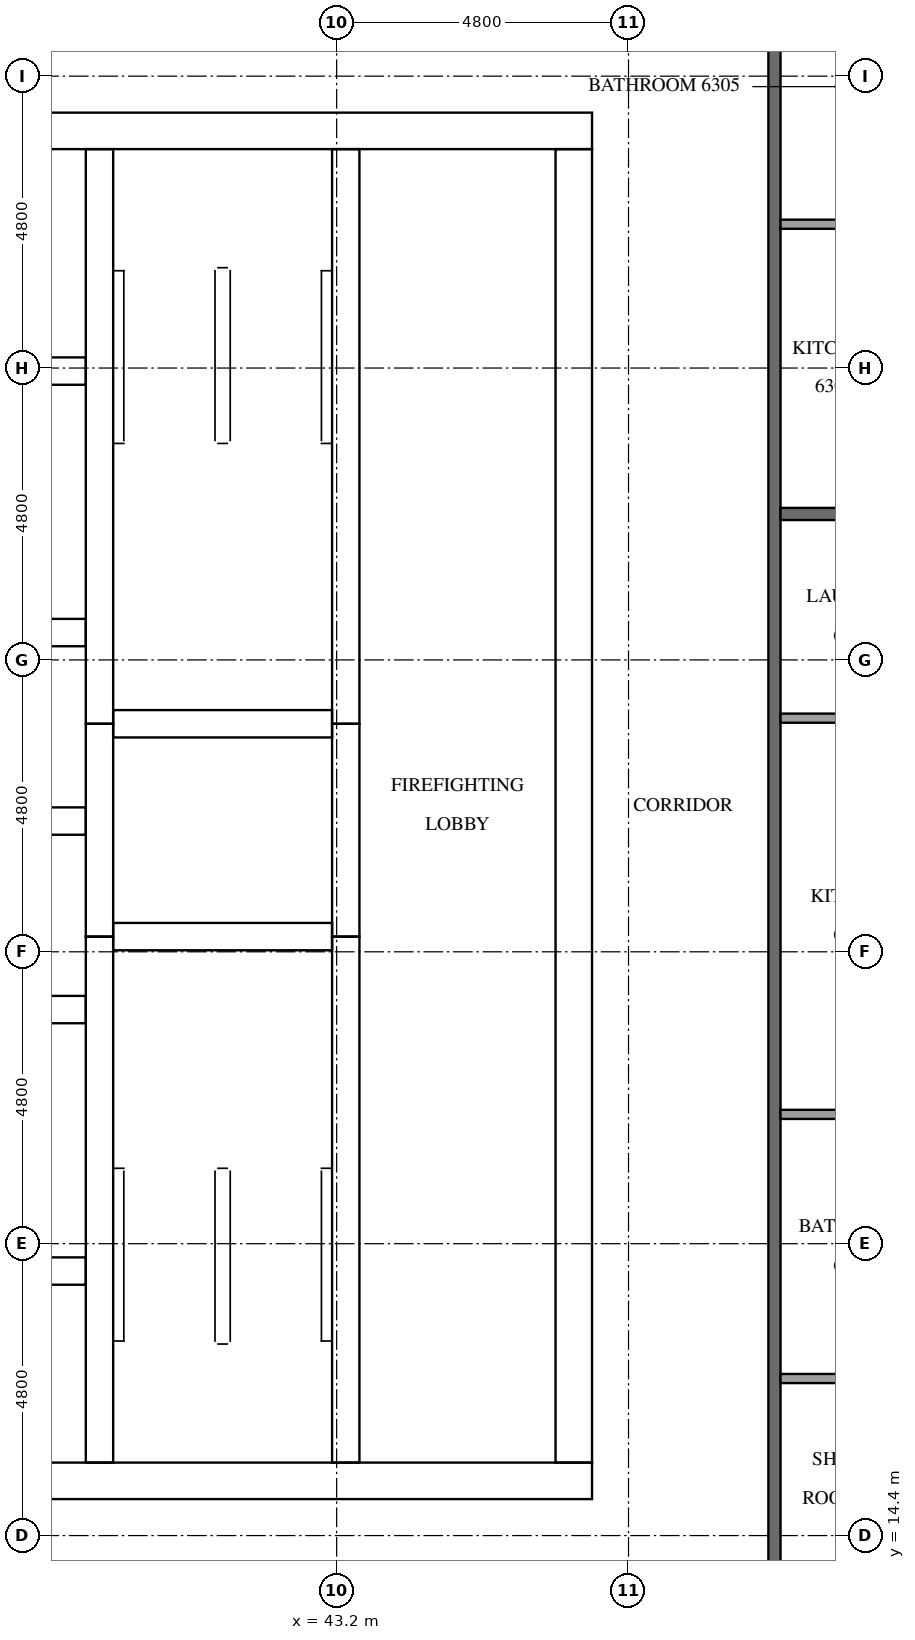
"""IFC4 building model, lengths in metres.
Left out: names, types, materials, properties, quantities, classifications, styles, units other than length and angle.
Written with IfcOpenShell. Run it as: python <this file> out.ifc"""

import sys

from ifc_helpers import new_model, si_unit, direction, frame, frame_2d, origin, place, context, subcontext, project, spatial, rectangle, extrude, element, fill, save


model = new_model("IFC4")
c1 = context("Model", 3, precision=1e-05, world=origin(), true_north=direction((0.0, 1.0)))
c2 = subcontext(c1, "Body", "Model", "MODEL_VIEW")
j1 = project(units=[si_unit("LENGTHUNIT", "METRE"), si_unit("PLANEANGLEUNIT", "RADIAN")], contexts=[c1])
p1 = place(None, origin())
s1 = spatial("IfcSite", under=j1, at=p1, CompositionType="ELEMENT")
p2 = place(p1, origin())
s2 = spatial("IfcBuilding", under=s1, at=p2, CompositionType="ELEMENT")
p3 = place(p2, frame((0.0, 0.0, 242.2)))
s3 = spatial("IfcBuildingStorey", under=s2, at=p3, CompositionType="ELEMENT", Elevation=242.2)
p4 = place(p3, frame((15.0, 15.3, 0.0), z_axis=(0.0, 0.0, 1.0), x_axis=(1.0, 0.0, 0.0)))
e1 = element("IfcWall", 1, at=p4, inside=s3, PredefinedType="SHEAR", context=c2, shape_type="SweptSolid", body=[
    extrude(rectangle(XDim=32.4, YDim=0.6, at=frame_2d((16.2, 0.0))), origin(), (0.0, 0.0, 1.0), 3.2),
])
p5 = place(p4, frame((15.3, 0.0, 0.0)))
e2 = element("IfcOpeningElement", 2, at=p5, cuts=e1, PredefinedType="OPENING", context=c2, shape_type="SweptSolid", body=[
    extrude(rectangle(XDim=1.8, YDim=2.1, at=frame_2d((0.9, 1.05))), frame((0.0, 0.31, 0.0), z_axis=(0.0, -1.0, 0.0), x_axis=(1.0, 0.0, 0.0)), (0.0, 0.0, 1.0), 0.62),
])
p6 = place(p3, frame((15.0, 37.5, 0.0), z_axis=(0.0, 0.0, 1.0), x_axis=(1.0, 0.0, 0.0)))
e3 = element("IfcWall", 3, at=p6, inside=s3, PredefinedType="SHEAR", context=c2, shape_type="SweptSolid", body=[
    extrude(rectangle(XDim=32.4, YDim=0.6, at=frame_2d((16.2, 0.0))), origin(), (0.0, 0.0, 1.0), 3.2),
])
p7 = place(p6, frame((15.3, 0.0, 0.0)))
e4 = element("IfcOpeningElement", 4, at=p7, cuts=e3, PredefinedType="OPENING", context=c2, shape_type="SweptSolid", body=[
    extrude(rectangle(XDim=1.8, YDim=2.1, at=frame_2d((0.9, 1.05))), frame((0.0, 0.31, 0.0), z_axis=(0.0, -1.0, 0.0), x_axis=(1.0, 0.0, 0.0)), (0.0, 0.0, 1.0), 0.62),
])
p8 = place(p6, frame((1.25, 0.0, 0.0)))
e5 = element("IfcOpeningElement", 5, at=p8, cuts=e3, PredefinedType="OPENING", context=c2, shape_type="SweptSolid", body=[
    extrude(rectangle(XDim=1.0, YDim=2.1, at=frame_2d((0.5, 1.05))), frame((0.0, 0.31, 0.0), z_axis=(0.0, -1.0, 0.0), x_axis=(1.0, 0.0, 0.0)), (0.0, 0.0, 1.0), 0.62),
])
p9 = place(p6, frame((4.988, 0.0, 0.0)))
e6 = element("IfcOpeningElement", 6, at=p9, cuts=e3, PredefinedType="OPENING", context=c2, shape_type="SweptSolid", body=[
    extrude(rectangle(XDim=1.0, YDim=2.1, at=frame_2d((0.5, 1.05))), frame((0.0, 0.31, 0.0), z_axis=(0.0, -1.0, 0.0), x_axis=(1.0, 0.0, 0.0)), (0.0, 0.0, 1.0), 0.62),
])
p10 = place(p3, frame((47.1, 15.6, 0.0), z_axis=(0.0, 0.0, 1.0), x_axis=(0.0, 1.0, 0.0)))
e7 = element("IfcWall", 7, at=p10, inside=s3, PredefinedType="SHEAR", context=c2, shape_type="SweptSolid", body=[
    extrude(rectangle(XDim=21.6, YDim=0.6, at=frame_2d((10.8, 0.0))), origin(), (0.0, 0.0, 1.0), 3.2),
])
p11 = place(p10, frame((10.5, 0.0, 0.0)))
e8 = element("IfcOpeningElement", 8, at=p11, cuts=e7, PredefinedType="OPENING", context=c2, shape_type="SweptSolid", body=[
    extrude(rectangle(XDim=1.2, YDim=2.1, at=frame_2d((0.6, 1.05))), frame((0.0, 0.31, 0.0), z_axis=(0.0, -1.0, 0.0), x_axis=(1.0, 0.0, 0.0)), (0.0, 0.0, 1.0), 0.62),
])
p12 = place(p3, frame((39.3, 15.6, 0.0), z_axis=(0.0, 0.0, 1.0), x_axis=(0.0, 1.0, 0.0)))
e9 = element("IfcWall", 9, at=p12, inside=s3, PredefinedType="SHEAR", context=c2, shape_type="SweptSolid", body=[
    extrude(rectangle(XDim=8.65, YDim=0.45, at=frame_2d((4.325, 0.0))), origin(), (0.0, 0.0, 1.0), 3.2),
])
p13 = place(p3, frame((39.3, 24.25, 0.0), z_axis=(0.0, 0.0, 1.0), x_axis=(0.0, 1.0, 0.0)))
e10 = element("IfcWall", 10, at=p13, inside=s3, PredefinedType="SHEAR", context=c2, shape_type="SweptSolid", body=[
    extrude(rectangle(XDim=3.5, YDim=0.45, at=frame_2d((1.75, 0.0))), origin(), (0.0, 0.0, 1.0), 3.2),
])
p14 = place(p3, frame((39.3, 27.75, 0.0), z_axis=(0.0, 0.0, 1.0), x_axis=(0.0, 1.0, 0.0)))
e11 = element("IfcWall", 11, at=p14, inside=s3, PredefinedType="SHEAR", context=c2, shape_type="SweptSolid", body=[
    extrude(rectangle(XDim=9.45, YDim=0.45, at=frame_2d((4.725, 0.0))), origin(), (0.0, 0.0, 1.0), 3.2),
])
p15 = place(p3, frame((43.35, 15.6, 0.0), z_axis=(0.0, 0.0, 1.0), x_axis=(0.0, 1.0, 0.0)))
e12 = element("IfcWall", 12, at=p15, inside=s3, PredefinedType="SHEAR", context=c2, shape_type="SweptSolid", body=[
    extrude(rectangle(XDim=8.65, YDim=0.45, at=frame_2d((4.325, 0.0))), origin(), (0.0, 0.0, 1.0), 3.2),
])
p16 = place(p15, frame((0.6, 0.0, 0.0)))
e13 = element("IfcOpeningElement", 13, at=p16, cuts=e12, PredefinedType="OPENING", context=c2, shape_type="SweptSolid", body=[
    extrude(rectangle(XDim=1.2, YDim=2.1, at=frame_2d((0.6, 1.05))), frame((0.0, 0.235, 0.0), z_axis=(0.0, -1.0, 0.0), x_axis=(1.0, 0.0, 0.0)), (0.0, 0.0, 1.0), 0.47),
])
p17 = place(p3, frame((43.35, 24.25, 0.0), z_axis=(0.0, 0.0, 1.0), x_axis=(0.0, 1.0, 0.0)))
e14 = element("IfcWall", 14, at=p17, inside=s3, PredefinedType="SHEAR", context=c2, shape_type="SweptSolid", body=[
    extrude(rectangle(XDim=3.5, YDim=0.45, at=frame_2d((1.75, 0.0))), origin(), (0.0, 0.0, 1.0), 3.2),
])
p18 = place(p17, frame((1.2, 0.0, 0.0)))
e15 = element("IfcOpeningElement", 15, at=p18, cuts=e14, PredefinedType="OPENING", context=c2, shape_type="SweptSolid", body=[
    extrude(rectangle(XDim=1.1, YDim=2.1, at=frame_2d((0.55, 1.05))), frame((0.0, 0.235, 0.0), z_axis=(0.0, -1.0, 0.0), x_axis=(1.0, 0.0, 0.0)), (0.0, 0.0, 1.0), 0.47),
])
p19 = place(p3, frame((43.35, 27.75, 0.0), z_axis=(0.0, 0.0, 1.0), x_axis=(0.0, 1.0, 0.0)))
e16 = element("IfcWall", 16, at=p19, inside=s3, PredefinedType="SHEAR", context=c2, shape_type="SweptSolid", body=[
    extrude(rectangle(XDim=9.45, YDim=0.45, at=frame_2d((4.725, 0.0))), origin(), (0.0, 0.0, 1.0), 3.2),
])
p20 = place(p19, frame((7.65, 0.0, 0.0)))
e17 = element("IfcOpeningElement", 17, at=p20, cuts=e16, PredefinedType="OPENING", context=c2, shape_type="SweptSolid", body=[
    extrude(rectangle(XDim=1.2, YDim=2.1, at=frame_2d((0.6, 1.05))), frame((0.0, 0.235, 0.0), z_axis=(0.0, -1.0, 0.0), x_axis=(1.0, 0.0, 0.0)), (0.0, 0.0, 1.0), 0.47),
])
for number, where, z_axis, x_axis in (
    (18, (39.525, 24.25, 0.0), (0.0, 0.0, 1.0), (1.0, 0.0, 0.0)),
    (19, (39.525, 27.75, 0.0), (0.0, 0.0, 1.0), (1.0, 0.0, 0.0)),
):
    element("IfcWall", number, at=place(p3, frame(where, z_axis=z_axis, x_axis=x_axis)), inside=s3, PredefinedType="SHEAR", context=c2, shape_type="SweptSolid", body=[
        extrude(rectangle(XDim=3.6, YDim=0.45, at=frame_2d((1.8, 0.0))), origin(), (0.0, 0.0, 1.0), 3.2),
    ])
p21 = place(p3, frame((33.475, 18.75, 0.0), z_axis=(0.0, 0.0, 1.0), x_axis=(1.0, 0.0, 0.0)))
e20 = element("IfcWall", 20, at=p21, inside=s3, PredefinedType="SHEAR", context=c2, shape_type="SweptSolid", body=[
    extrude(rectangle(XDim=5.6, YDim=0.45, at=frame_2d((2.8, 0.0))), origin(), (0.0, 0.0, 1.0), 3.2),
])
p22 = place(p21, frame((2.525, 0.0, 0.0)))
e21 = element("IfcOpeningElement", 21, at=p22, cuts=e20, PredefinedType="OPENING", context=c2, shape_type="SweptSolid", body=[
    extrude(rectangle(XDim=1.0, YDim=2.1, at=frame_2d((0.5, 1.05))), frame((0.0, 0.235, 0.0), z_axis=(0.0, -1.0, 0.0), x_axis=(1.0, 0.0, 0.0)), (0.0, 0.0, 1.0), 0.47),
])
p23 = place(p3, frame((23.325, 23.05, 0.0), z_axis=(0.0, 0.0, 1.0), x_axis=(1.0, 0.0, 0.0)))
e22 = element("IfcWall", 22, at=p23, inside=s3, PredefinedType="SHEAR", context=c2, shape_type="SweptSolid", body=[
    extrude(rectangle(XDim=15.75, YDim=0.45, at=frame_2d((7.875, 0.0))), origin(), (0.0, 0.0, 1.0), 3.2),
])
p24 = place(p23, frame((2.058, 0.0, 0.0)))
e23 = element("IfcOpeningElement", 23, at=p24, cuts=e22, PredefinedType="OPENING", context=c2, shape_type="SweptSolid", body=[
    extrude(rectangle(XDim=1.0, YDim=2.1, at=frame_2d((0.5, 1.05))), frame((0.0, 0.235, 0.0), z_axis=(0.0, -1.0, 0.0), x_axis=(1.0, 0.0, 0.0)), (0.0, 0.0, 1.0), 0.47),
])
p25 = place(p23, frame((12.692, 0.0, 0.0)))
e24 = element("IfcOpeningElement", 24, at=p25, cuts=e22, PredefinedType="OPENING", context=c2, shape_type="SweptSolid", body=[
    extrude(rectangle(XDim=1.0, YDim=2.1, at=frame_2d((0.5, 1.05))), frame((0.0, 0.235, 0.0), z_axis=(0.0, -1.0, 0.0), x_axis=(1.0, 0.0, 0.0)), (0.0, 0.0, 1.0), 0.47),
])
p26 = place(p3, frame((23.325, 26.15, 0.0), z_axis=(0.0, 0.0, 1.0), x_axis=(1.0, 0.0, 0.0)))
e25 = element("IfcWall", 25, at=p26, inside=s3, PredefinedType="SHEAR", context=c2, shape_type="SweptSolid", body=[
    extrude(rectangle(XDim=15.75, YDim=0.45, at=frame_2d((7.875, 0.0))), origin(), (0.0, 0.0, 1.0), 3.2),
])
p27 = place(p3, frame((23.325, 29.25, 0.0), z_axis=(0.0, 0.0, 1.0), x_axis=(1.0, 0.0, 0.0)))
e26 = element("IfcWall", 26, at=p27, inside=s3, PredefinedType="SHEAR", context=c2, shape_type="SweptSolid", body=[
    extrude(rectangle(XDim=15.75, YDim=0.45, at=frame_2d((7.875, 0.0))), origin(), (0.0, 0.0, 1.0), 3.2),
])
p28 = place(p27, frame((0.679, 0.0, 0.0)))
e27 = element("IfcOpeningElement", 27, at=p28, cuts=e26, PredefinedType="OPENING", context=c2, shape_type="SweptSolid", body=[
    extrude(rectangle(XDim=1.1, YDim=2.1, at=frame_2d((0.55, 1.05))), frame((0.0, 0.235, 0.0), z_axis=(0.0, -1.0, 0.0), x_axis=(1.0, 0.0, 0.0)), (0.0, 0.0, 1.0), 0.47),
])
p29 = place(p27, frame((3.337, 0.0, 0.0)))
e28 = element("IfcOpeningElement", 28, at=p29, cuts=e26, PredefinedType="OPENING", context=c2, shape_type="SweptSolid", body=[
    extrude(rectangle(XDim=1.1, YDim=2.1, at=frame_2d((0.55, 1.05))), frame((0.0, 0.235, 0.0), z_axis=(0.0, -1.0, 0.0), x_axis=(1.0, 0.0, 0.0)), (0.0, 0.0, 1.0), 0.47),
])
p30 = place(p27, frame((5.996, 0.0, 0.0)))
e29 = element("IfcOpeningElement", 29, at=p30, cuts=e26, PredefinedType="OPENING", context=c2, shape_type="SweptSolid", body=[
    extrude(rectangle(XDim=1.1, YDim=2.1, at=frame_2d((0.55, 1.05))), frame((0.0, 0.235, 0.0), z_axis=(0.0, -1.0, 0.0), x_axis=(1.0, 0.0, 0.0)), (0.0, 0.0, 1.0), 0.47),
])
p31 = place(p27, frame((8.654, 0.0, 0.0)))
e30 = element("IfcOpeningElement", 30, at=p31, cuts=e26, PredefinedType="OPENING", context=c2, shape_type="SweptSolid", body=[
    extrude(rectangle(XDim=1.1, YDim=2.1, at=frame_2d((0.55, 1.05))), frame((0.0, 0.235, 0.0), z_axis=(0.0, -1.0, 0.0), x_axis=(1.0, 0.0, 0.0)), (0.0, 0.0, 1.0), 0.47),
])
p32 = place(p27, frame((11.312, 0.0, 0.0)))
e31 = element("IfcOpeningElement", 31, at=p32, cuts=e26, PredefinedType="OPENING", context=c2, shape_type="SweptSolid", body=[
    extrude(rectangle(XDim=1.1, YDim=2.1, at=frame_2d((0.55, 1.05))), frame((0.0, 0.235, 0.0), z_axis=(0.0, -1.0, 0.0), x_axis=(1.0, 0.0, 0.0)), (0.0, 0.0, 1.0), 0.47),
])
p33 = place(p27, frame((13.971, 0.0, 0.0)))
e32 = element("IfcOpeningElement", 32, at=p33, cuts=e26, PredefinedType="OPENING", context=c2, shape_type="SweptSolid", body=[
    extrude(rectangle(XDim=1.1, YDim=2.1, at=frame_2d((0.55, 1.05))), frame((0.0, 0.235, 0.0), z_axis=(0.0, -1.0, 0.0), x_axis=(1.0, 0.0, 0.0)), (0.0, 0.0, 1.0), 0.47),
])
p34 = place(p3, frame((33.475, 33.55, 0.0), z_axis=(0.0, 0.0, 1.0), x_axis=(1.0, 0.0, 0.0)))
e33 = element("IfcWall", 33, at=p34, inside=s3, PredefinedType="SHEAR", context=c2, shape_type="SweptSolid", body=[
    extrude(rectangle(XDim=5.6, YDim=0.45, at=frame_2d((2.8, 0.0))), origin(), (0.0, 0.0, 1.0), 3.2),
])
p35 = place(p34, frame((2.525, 0.0, 0.0)))
e34 = element("IfcOpeningElement", 34, at=p35, cuts=e33, PredefinedType="OPENING", context=c2, shape_type="SweptSolid", body=[
    extrude(rectangle(XDim=1.0, YDim=2.1, at=frame_2d((0.5, 1.05))), frame((0.0, 0.235, 0.0), z_axis=(0.0, -1.0, 0.0), x_axis=(1.0, 0.0, 0.0)), (0.0, 0.0, 1.0), 0.47),
])
p36 = place(p3, frame((50.4, 40.7, 0.0), z_axis=(0.0, 0.0, 1.0), x_axis=(0.0, -1.0, 0.0)))
e35 = element("IfcWall", 35, at=p36, inside=s3, PredefinedType="PARTITIONING", context=c2, shape_type="SweptSolid", body=[
    extrude(rectangle(XDim=28.6, YDim=0.2, at=frame_2d((14.3, 0.0))), origin(), (0.0, 0.0, 1.0), 3.2),
])
p37 = place(p36, frame((27.3, 0.0, 0.0)))
e36 = element("IfcOpeningElement", 36, at=p37, cuts=e35, PredefinedType="OPENING", context=c2, shape_type="SweptSolid", body=[
    extrude(rectangle(XDim=1.1, YDim=2.1, at=frame_2d((0.55, 1.05))), frame((0.0, 0.11, 0.0), z_axis=(0.0, -1.0, 0.0), x_axis=(1.0, 0.0, 0.0)), (0.0, 0.0, 1.0), 0.22),
])
p38 = place(p36, frame((0.25, 0.0, 0.0)))
e37 = element("IfcOpeningElement", 37, at=p38, cuts=e35, PredefinedType="OPENING", context=c2, shape_type="SweptSolid", body=[
    extrude(rectangle(XDim=1.0, YDim=2.1, at=frame_2d((0.5, 1.05))), frame((0.0, 0.11, 0.0), z_axis=(0.0, -1.0, 0.0), x_axis=(1.0, 0.0, 0.0)), (0.0, 0.0, 1.0), 0.22),
])
p39 = place(p3, frame((50.5, 31.2, 0.0), z_axis=(0.0, 0.0, 1.0), x_axis=(1.0, 0.0, 0.0)))
e38 = element("IfcWall", 38, at=p39, inside=s3, PredefinedType="PARTITIONING", context=c2, shape_type="SweptSolid", body=[
    extrude(rectangle(XDim=7.0, YDim=0.2, at=frame_2d((3.5, 0.0))), origin(), (0.0, 0.0, 1.0), 3.2),
])
for number, where, z_axis, x_axis in (
    (39, (50.5, 16.983, 0.0), (0.0, 0.0, 1.0), (1.0, 0.0, 0.0)),
    (40, (50.5, 21.327, 0.0), (0.0, 0.0, 1.0), (1.0, 0.0, 0.0)),
    (41, (50.5, 27.842, 0.0), (0.0, 0.0, 1.0), (1.0, 0.0, 0.0)),
):
    element("IfcWall", number, at=place(p3, frame(where, z_axis=z_axis, x_axis=x_axis)), inside=s3, PredefinedType="PARTITIONING", context=c2, shape_type="SweptSolid", body=[
        extrude(rectangle(XDim=2.375, YDim=0.15, at=frame_2d((1.188, 0.0))), origin(), (0.0, 0.0, 1.0), 3.2),
    ])
p40 = place(p3, frame((50.5, 35.965, 0.0), z_axis=(0.0, 0.0, 1.0), x_axis=(1.0, 0.0, 0.0)))
e42 = element("IfcWall", 42, at=p40, inside=s3, PredefinedType="PARTITIONING", context=c2, shape_type="SweptSolid", body=[
    extrude(rectangle(XDim=1.775, YDim=0.15, at=frame_2d((0.887, 0.0))), origin(), (0.0, 0.0, 1.0), 3.2),
])
p41 = place(p18, origin())
e43 = element("IfcDoor", 43, at=p41, inside=s3, OperationType="DOUBLE_DOOR_SLIDING", PredefinedType="DOOR", context=c2, shape_type="SweptSolid", body=[
    extrude(rectangle(XDim=1.1, YDim=2.1, at=frame_2d((0.55, 1.05))), frame((0.0, 0.025, 0.0), z_axis=(0.0, -1.0, 0.0), x_axis=(1.0, 0.0, 0.0)), (0.0, 0.0, 1.0), 0.05),
])
fill(e15, e43)
p42 = place(p16, origin())
e44 = element("IfcDoor", 44, at=p42, inside=s3, OperationType="SINGLE_SWING_RIGHT", PredefinedType="DOOR", context=c2, shape_type="SweptSolid", body=[
    extrude(rectangle(XDim=1.2, YDim=2.1, at=frame_2d((0.6, 1.05))), frame((0.0, 0.025, 0.0), z_axis=(0.0, -1.0, 0.0), x_axis=(1.0, 0.0, 0.0)), (0.0, 0.0, 1.0), 0.05),
])
fill(e13, e44)
p43 = place(p20, origin())
e45 = element("IfcDoor", 45, at=p43, inside=s3, OperationType="SINGLE_SWING_LEFT", PredefinedType="DOOR", context=c2, shape_type="SweptSolid", body=[
    extrude(rectangle(XDim=1.2, YDim=2.1, at=frame_2d((0.6, 1.05))), frame((0.0, 0.025, 0.0), z_axis=(0.0, -1.0, 0.0), x_axis=(1.0, 0.0, 0.0)), (0.0, 0.0, 1.0), 0.05),
])
fill(e17, e45)
p44 = place(p11, origin())
e46 = element("IfcDoor", 46, at=p44, inside=s3, OperationType="SINGLE_SWING_LEFT", PredefinedType="DOOR", context=c2, shape_type="SweptSolid", body=[
    extrude(rectangle(XDim=1.2, YDim=2.1, at=frame_2d((0.6, 1.05))), frame((0.0, 0.025, 0.0), z_axis=(0.0, -1.0, 0.0), x_axis=(1.0, 0.0, 0.0)), (0.0, 0.0, 1.0), 0.05),
])
fill(e8, e46)
save(model, sys.argv[1])
